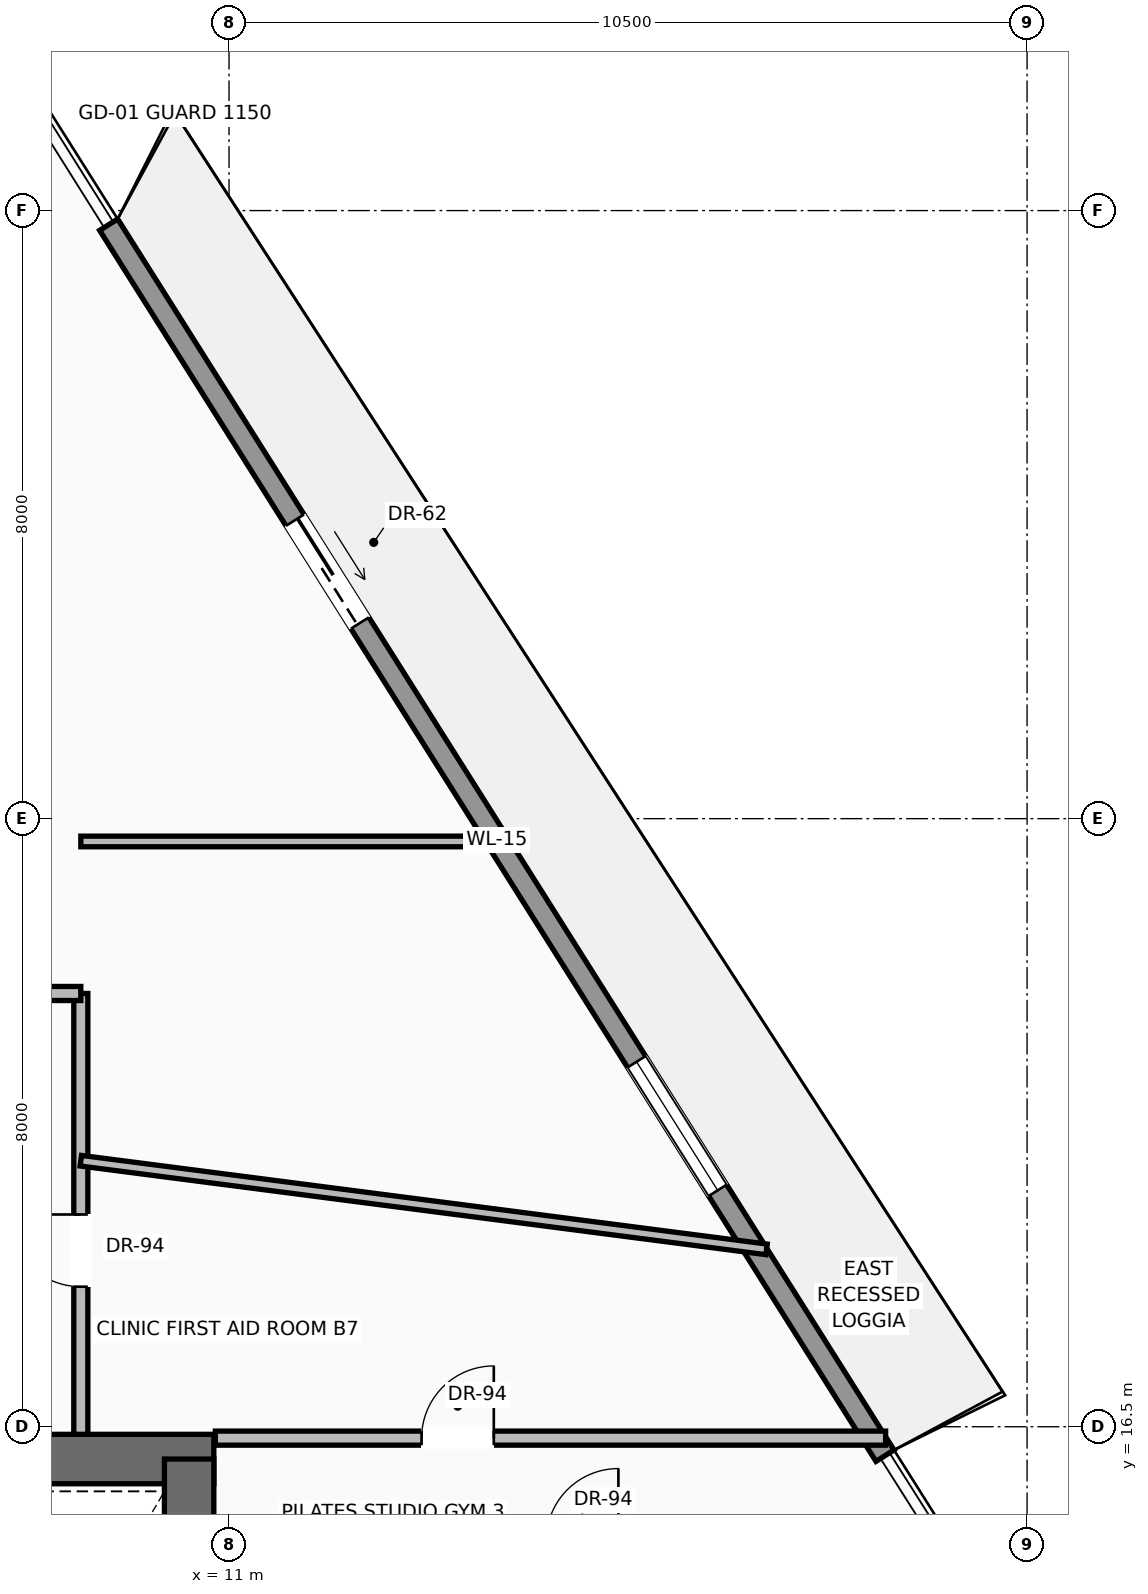
"""IFC4 building model, lengths in metres.
Left out: names, types, materials, properties, quantities, classifications, styles, units other than length and angle.
Written with IfcOpenShell. Run it as: python <this file> out.ifc"""

import sys

from ifc_helpers import new_model, si_unit, direction, frame, frame_2d, origin, place, context, subcontext, project, spatial, rectangle, extrude, source, transform, mapped, element, fill, save


model = new_model("IFC4")
c1 = context("Model", 3, precision=1e-05, world=origin(), true_north=direction((0.0, 1.0)))
c2 = subcontext(c1, "Body", "Model", "MODEL_VIEW")
j1 = project(units=[si_unit("LENGTHUNIT", "METRE"), si_unit("PLANEANGLEUNIT", "RADIAN")], contexts=[c1])
p1 = place(None, origin())
s1 = spatial("IfcSite", under=j1, at=p1, CompositionType="ELEMENT")
p2 = place(p1, origin())
s2 = spatial("IfcBuilding", under=s1, at=p2, CompositionType="ELEMENT")
p3 = place(p2, frame((0.0, 0.0, 204.3)))
s3 = spatial("IfcBuildingStorey", under=s2, at=p3, CompositionType="ELEMENT", Elevation=204.3)
p4 = place(p3, frame((-10.8, 16.075, 0.0), z_axis=(0.0, 0.0, 1.0), x_axis=(1.0, 0.0, 0.0)))
e1 = element("IfcWall", 1, at=p4, inside=s3, PredefinedType="SHEAR", context=c2, shape_type="SweptSolid", body=[
    extrude(rectangle(XDim=21.6, YDim=0.65, at=frame_2d((10.8, 0.0))), origin(), (0.0, 0.0, 1.0), 3.47),
])
p5 = place(p4, frame((3.37, 0.0, 0.0)))
e2 = element("IfcOpeningElement", 2, at=p5, cuts=e1, PredefinedType="OPENING", context=c2, shape_type="SweptSolid", body=[
    extrude(rectangle(XDim=1.3, YDim=2.3, at=frame_2d((0.65, 1.15))), frame((0.0, 0.335, 0.0), z_axis=(0.0, -1.0, 0.0), x_axis=(1.0, 0.0, 0.0)), (0.0, 0.0, 1.0), 0.67),
])
p6 = place(p4, frame((9.8, 0.0, 0.0)))
e3 = element("IfcOpeningElement", 3, at=p6, cuts=e1, PredefinedType="OPENING", context=c2, shape_type="SweptSolid", body=[
    extrude(rectangle(XDim=2.0, YDim=2.4, at=frame_2d((1.0, 1.2))), frame((0.0, 0.335, 0.0), z_axis=(0.0, -1.0, 0.0), x_axis=(1.0, 0.0, 0.0)), (0.0, 0.0, 1.0), 0.67),
])
p7 = place(p3, frame((10.475, 0.525, 0.0), z_axis=(0.0, 0.0, 1.0), x_axis=(0.0, 1.0, 0.0)))
e4 = element("IfcWall", 4, at=p7, inside=s3, PredefinedType="SHEAR", context=c2, shape_type="SweptSolid", body=[
    extrude(rectangle(XDim=15.55, YDim=0.65, at=frame_2d((7.775, 0.0))), origin(), (0.0, 0.0, 1.0), 3.47),
])
p8 = place(p3, frame((9.417, 32.314, 0.0), z_axis=(0.0, 0.0, 1.0), x_axis=(0.533466142651, -0.845821420067, 0.0)))
e5 = element("IfcWall", 5, at=p8, inside=s3, PredefinedType="SOLIDWALL", context=c2, shape_type="SweptSolid", body=[
    extrude(rectangle(XDim=19.147, YDim=0.28, at=frame_2d((9.574, 0.0))), origin(), (0.0, 0.0, 1.0), 3.05),
])
p9 = place(p8, frame((4.595, 0.0, 0.0)))
e6 = element("IfcOpeningElement", 6, at=p9, cuts=e5, PredefinedType="OPENING", context=c2, shape_type="SweptSolid", body=[
    extrude(rectangle(XDim=1.6, YDim=2.35, at=frame_2d((0.8, 1.175))), frame((0.0, 0.15, 0.0), z_axis=(0.0, -1.0, 0.0), x_axis=(1.0, 0.0, 0.0)), (0.0, 0.0, 1.0), 0.3),
])
p10 = place(p8, frame((13.02, 0.0, 0.9)))
e7 = element("IfcOpeningElement", 7, at=p10, cuts=e5, PredefinedType="OPENING", context=c2, shape_type="SweptSolid", body=[
    extrude(rectangle(XDim=2.0, YDim=1.85, at=frame_2d((1.0, 0.925))), frame((0.0, 0.15, 0.0), z_axis=(0.0, -1.0, 0.0), x_axis=(1.0, 0.0, 0.0)), (0.0, 0.0, 1.0), 0.3),
])
p11 = place(p3, frame((9.05, 16.4, 0.0), z_axis=(0.0, 0.0, 1.0), x_axis=(0.0, 1.0, 0.0)))
e8 = element("IfcWall", 8, at=p11, inside=s3, PredefinedType="PARTITIONING", context=c2, shape_type="SweptSolid", body=[
    extrude(rectangle(XDim=5.8, YDim=0.185, at=frame_2d((2.9, 0.0))), origin(), (0.0, 0.0, 1.0), 3.462),
])
p12 = place(p11, frame((1.942, 0.0, 0.0)))
e9 = element("IfcOpeningElement", 9, at=p12, cuts=e8, PredefinedType="OPENING", context=c2, shape_type="SweptSolid", body=[
    extrude(rectangle(XDim=0.95, YDim=2.2, at=frame_2d((0.475, 1.1))), frame((0.0, 0.103, 0.0), z_axis=(0.0, -1.0, 0.0), x_axis=(1.0, 0.0, 0.0)), (0.0, 0.0, 1.0), 0.205),
])
p13 = place(p3, frame((6.85, 22.2, 0.0), z_axis=(0.0, 0.0, 1.0), x_axis=(1.0, 0.0, 0.0)))
e10 = element("IfcWall", 10, at=p13, inside=s3, PredefinedType="PARTITIONING", context=c2, shape_type="SweptSolid", body=[
    extrude(rectangle(XDim=2.2, YDim=0.185, at=frame_2d((1.1, 0.0))), origin(), (0.0, 0.0, 1.0), 3.049),
])
p14 = place(p3, frame((10.82, 16.35, 0.0), z_axis=(0.0, 0.0, 1.0), x_axis=(1.0, 0.0, 0.0)))
e11 = element("IfcWall", 11, at=p14, inside=s3, PredefinedType="PARTITIONING", context=c2, shape_type="SweptSolid", body=[
    extrude(rectangle(XDim=8.819, YDim=0.185, at=frame_2d((4.409, 0.0))), origin(), (0.0, 0.0, 1.0), 3.462),
])
p15 = place(p14, frame((2.714, 0.0, 0.0)))
e12 = element("IfcOpeningElement", 12, at=p15, cuts=e11, PredefinedType="OPENING", context=c2, shape_type="SweptSolid", body=[
    extrude(rectangle(XDim=0.95, YDim=2.2, at=frame_2d((0.475, 1.1))), frame((0.0, 0.103, 0.0), z_axis=(0.0, -1.0, 0.0), x_axis=(1.0, 0.0, 0.0)), (0.0, 0.0, 1.0), 0.205),
])
p16 = place(p3, frame((9.05, 20.0, 0.0), z_axis=(0.0, 0.0, 1.0), x_axis=(0.991742120267, -0.128248067777, 0.0)))
e13 = element("IfcWall", 13, at=p16, inside=s3, PredefinedType="PARTITIONING", context=c2, shape_type="SweptSolid", body=[
    extrude(rectangle(XDim=9.098, YDim=0.14, at=frame_2d((4.549, 0.0))), origin(), (0.0, 0.0, 1.0), 3.049),
])
p17 = place(p3, frame((9.05, 24.2, 0.0), z_axis=(0.0, 0.0, 1.0), x_axis=(1.0, 0.0, 0.0)))
e14 = element("IfcWall", 14, at=p17, inside=s3, PredefinedType="PARTITIONING", context=c2, shape_type="SweptSolid", body=[
    extrude(rectangle(XDim=5.638, YDim=0.14, at=frame_2d((2.819, 0.0))), origin(), (0.0, 0.0, 1.0), 3.462),
])
m1 = source(origin(), c2, "Body", "SweptSolid", [
    extrude(rectangle(XDim=1.6, YDim=2.35, at=frame_2d((0.8, 1.175))), frame((0.0, 0.025, 0.0), z_axis=(0.0, -1.0, 0.0), x_axis=(1.0, 0.0, 0.0)), (0.0, 0.0, 1.0), 0.05),
])
p18 = place(p9, origin())
e15 = element("IfcDoor", 15, at=p18, inside=s3, OperationType="SLIDING_TO_RIGHT", PredefinedType="DOOR", context=c2, shape_type="MappedRepresentation", body=[
    mapped(m1, transform((0.0, 0.0, 0.0), scale=1.0)),
])
fill(e6, e15)
m2 = source(origin(), c2, "Body", "SweptSolid", [
    extrude(rectangle(XDim=2.0, YDim=1.85, at=frame_2d((1.0, 0.925))), frame((0.0, 0.03, 0.0), z_axis=(0.0, -1.0, 0.0), x_axis=(1.0, 0.0, 0.0)), (0.0, 0.0, 1.0), 0.06),
])
p19 = place(p10, origin())
e16 = element("IfcWindow", 16, at=p19, inside=s3, PartitioningType="SINGLE_PANEL", PredefinedType="WINDOW", context=c2, shape_type="MappedRepresentation", body=[
    mapped(m2, transform((0.0, 0.0, 0.0), scale=1.0)),
])
fill(e7, e16)
m3 = source(origin(), c2, "Body", "SweptSolid", [
    extrude(rectangle(XDim=0.95, YDim=2.2, at=frame_2d((0.475, 1.1))), frame((0.0, 0.025, 0.0), z_axis=(0.0, -1.0, 0.0), x_axis=(1.0, 0.0, 0.0)), (0.0, 0.0, 1.0), 0.05),
])
p20 = place(p12, origin())
e17 = element("IfcDoor", 17, at=p20, inside=s3, OperationType="SINGLE_SWING_RIGHT", PredefinedType="DOOR", context=c2, shape_type="MappedRepresentation", body=[
    mapped(m3, transform((0.0, 0.0, 0.0), scale=1.0)),
])
fill(e9, e17)
p21 = place(p15, origin())
e18 = element("IfcDoor", 18, at=p21, inside=s3, OperationType="SINGLE_SWING_RIGHT", PredefinedType="DOOR", context=c2, shape_type="MappedRepresentation", body=[
    mapped(m3, transform((0.0, 0.0, 0.0), scale=1.0)),
])
fill(e12, e18)
save(model, sys.argv[1])
